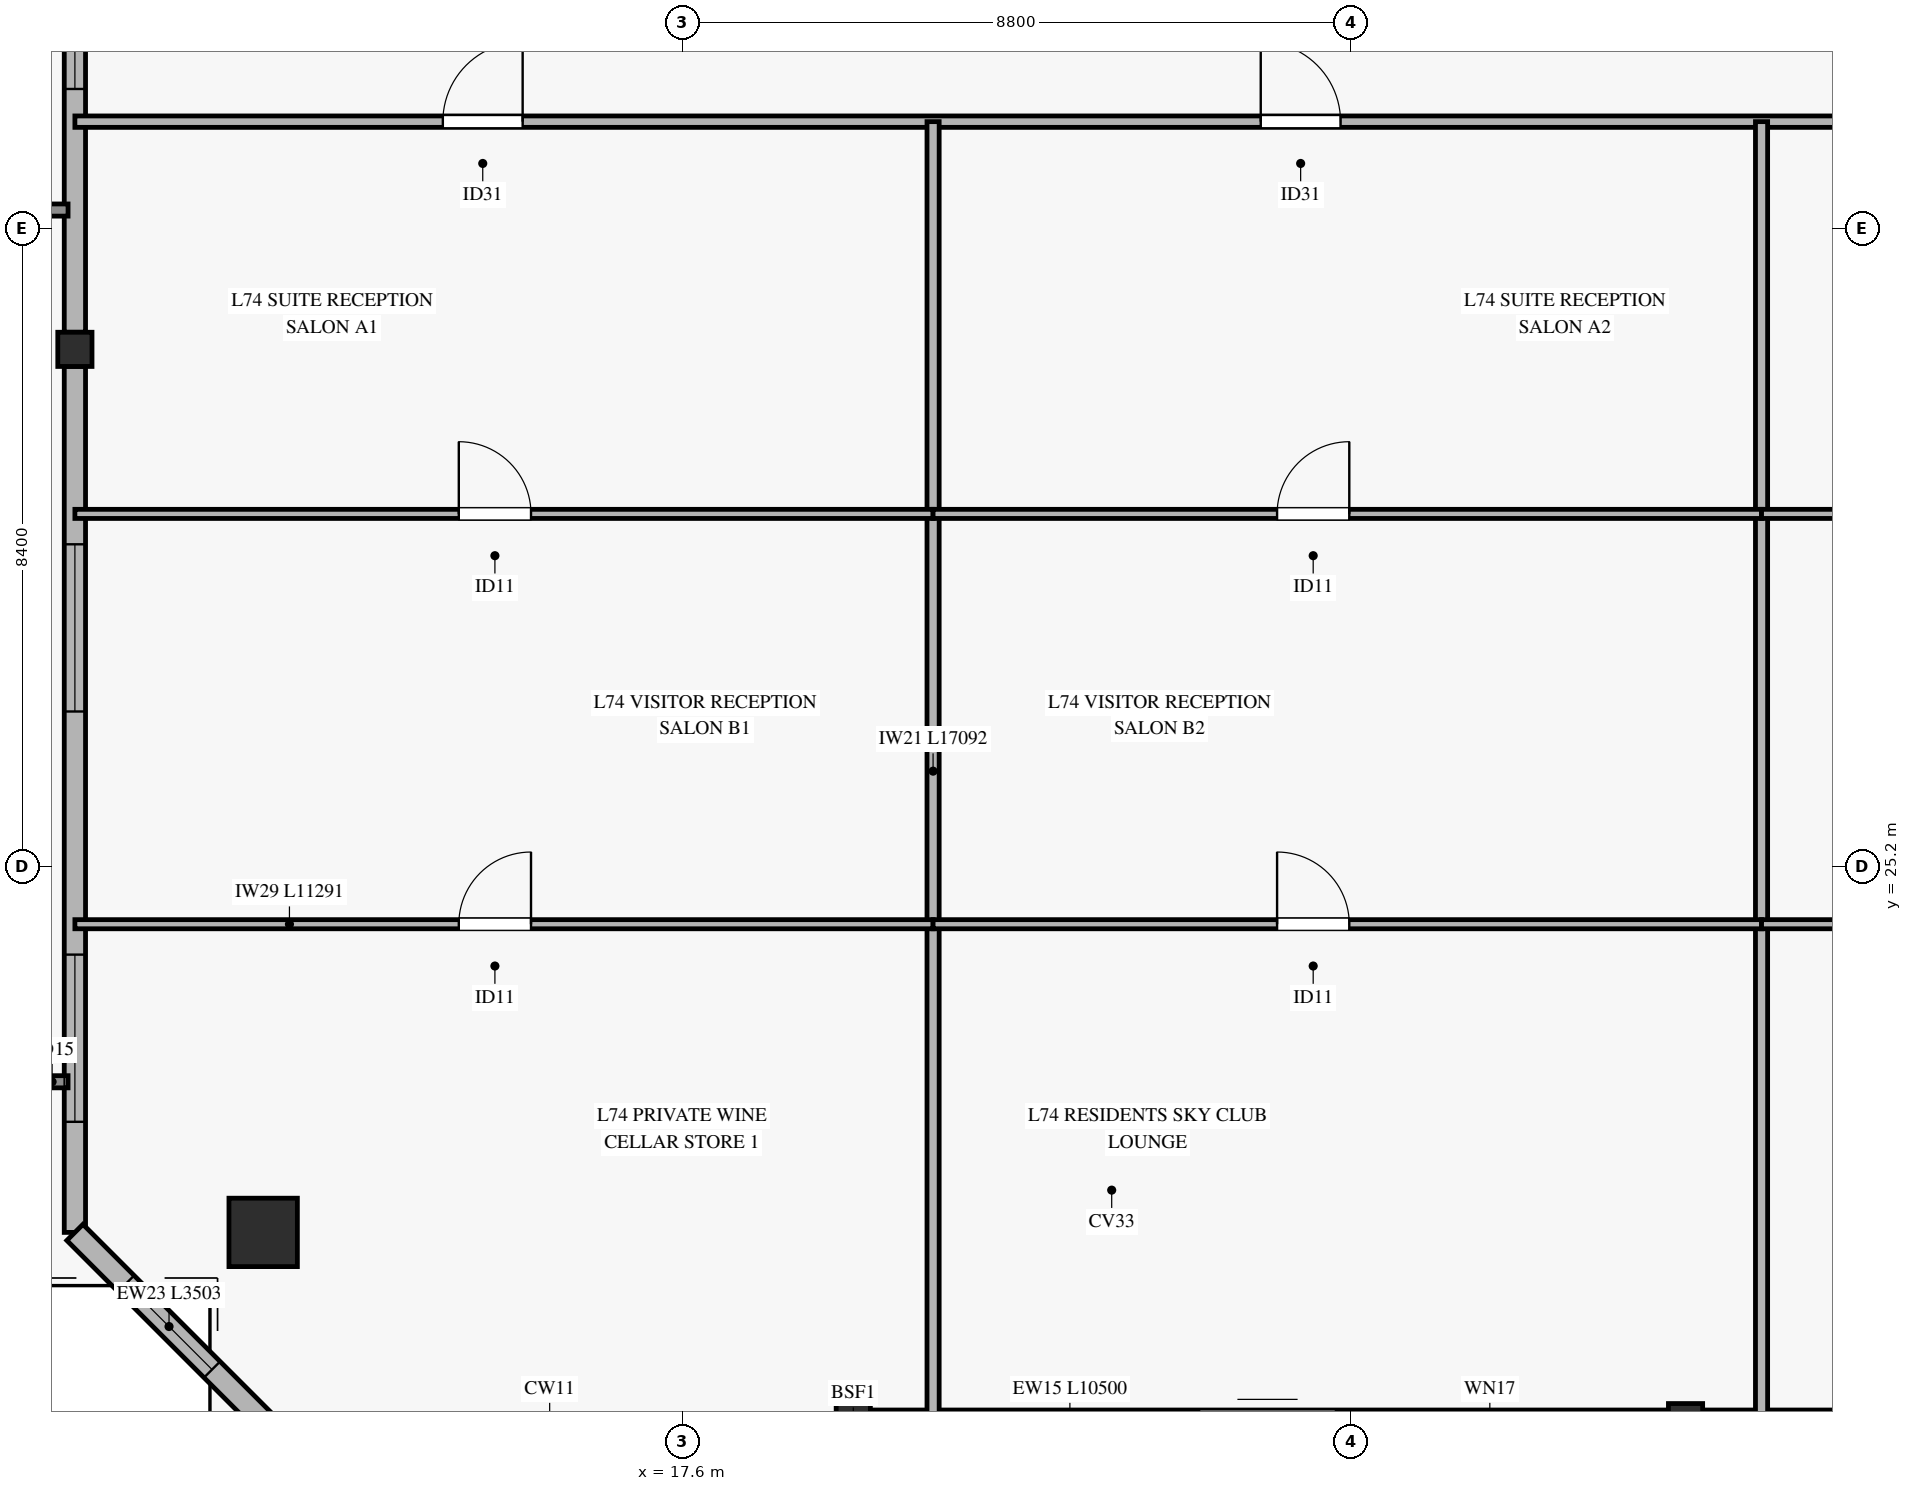
"""IFC4 building model, lengths in metres.
Left out: names, types, materials, properties, quantities, classifications, styles, units other than length and angle.
Written with IfcOpenShell. Run it as: python <this file> out.ifc"""

import sys

from ifc_helpers import new_model, si_unit, direction, frame, frame_2d, origin, origin_2d, place, context, subcontext, project, spatial, rectangle, hollow_rectangle, extrude, source, transform, mapped, element, fill, save


model = new_model("IFC4")
c1 = context("Model", 3, precision=1e-05, world=origin(), true_north=direction((0.0, 1.0)))
c2 = subcontext(c1, "Body", "Model", "MODEL_VIEW")
j1 = project(units=[si_unit("LENGTHUNIT", "METRE"), si_unit("PLANEANGLEUNIT", "RADIAN")], contexts=[c1])
p1 = place(None, origin())
s1 = spatial("IfcSite", under=j1, at=p1, CompositionType="ELEMENT")
p2 = place(p1, origin())
s2 = spatial("IfcBuilding", under=s1, at=p2, CompositionType="ELEMENT")
p3 = place(p2, frame((0.0, 0.0, 290.4)))
s3 = spatial("IfcBuildingStorey", under=s2, at=p3, CompositionType="ELEMENT", Elevation=290.4)
m1 = source(origin(), c2, "Body", "SweptSolid", [
    extrude(hollow_rectangle(XDim=0.9, YDim=0.9, WallThickness=0.04, at=origin_2d()), origin(), (0.0, 0.0, 1.0), 3.327),
])
p4 = place(p3, frame((12.086, 20.385, 0.0), z_axis=(0.110959828981, 0.266611811302, 0.957395455612), x_axis=(-0.923234733375, 0.384236420827, 0.0)))
e1 = element("IfcColumn", 1, at=p4, inside=s3, PredefinedType="COLUMN", context=c2, shape_type="MappedRepresentation", body=[
    mapped(m1, transform((0.0, 0.0, 0.0), x_axis=(1.0, 0.0, 0.0), y_axis=(0.0, 1.0, 0.0), z_axis=(0.0, 0.0, 1.0), scale=1.0)),
])
m2 = source(origin(), c2, "Body", "SweptSolid", [
    extrude(hollow_rectangle(XDim=0.45, YDim=0.45, WallThickness=0.022, at=origin_2d()), origin(), (0.0, 0.0, 1.0), 3.319),
])
for number, where, z_axis, x_axis in (
    (2, (19.85, 17.908, 0.0), (0.0, 0.281, 0.96), (-1.0, 0.0, 0.0)),
    (3, (30.8, 17.908, 0.0), (0.0, 0.281, 0.96), (-1.0, 0.0, 0.0)),
):
    element("IfcColumn", number, at=place(p3, frame(where, z_axis=z_axis, x_axis=x_axis)), inside=s3, PredefinedType="COLUMN", context=c2, shape_type="MappedRepresentation", body=[
        mapped(m2, transform((0.0, 0.0, 0.0), x_axis=(1.0, 0.0, 0.0), y_axis=(0.0, 1.0, 0.0), z_axis=(0.0, 0.0, 1.0), scale=1.0)),
    ])
m3 = source(origin(), c2, "Body", "SweptSolid", [
    extrude(hollow_rectangle(XDim=0.45, YDim=0.45, WallThickness=0.022, at=origin_2d()), origin(), (0.0, 0.0, 1.0), 3.246),
])
p5 = place(p3, frame((9.609, 32.004, 0.0), z_axis=(0.12787099786, 0.143892481709, 0.981297081222), x_axis=(-0.747495545809, 0.664266820635, 0.0)))
e4 = element("IfcColumn", 4, at=p5, inside=s3, PredefinedType="COLUMN", context=c2, shape_type="MappedRepresentation", body=[
    mapped(m3, transform((0.0, 0.0, 0.0), x_axis=(1.0, 0.0, 0.0), y_axis=(0.0, 1.0, 0.0), z_axis=(0.0, 0.0, 1.0), scale=1.0)),
])
p6 = place(p3, frame((20.075, 17.908, 0.0), z_axis=(0.0, 0.0, 1.0), x_axis=(1.0, 0.0, 0.0)))
e5 = element("IfcWall", 5, at=p6, inside=s3, PredefinedType="SOLIDWALL", context=c2, shape_type="SweptSolid", body=[
    extrude(rectangle(XDim=10.5, YDim=0.28, at=frame_2d((5.25, 0.0))), origin(), (0.0, 0.0, 1.0), 2.815),
])
p7 = place(p6, frame((4.325, 0.0, 0.0)))
e6 = element("IfcOpeningElement", 6, at=p7, cuts=e5, PredefinedType="OPENING", context=c2, shape_type="SweptSolid", body=[
    extrude(rectangle(XDim=1.8, YDim=2.25, at=frame_2d((0.9, 1.125))), frame((0.0, 0.15, 0.0), z_axis=(0.0, -1.0, 0.0), x_axis=(1.0, 0.0, 0.0)), (0.0, 0.0, 1.0), 0.3),
])
p8 = place(p6, frame((1.245, 0.0, 0.45)))
e7 = element("IfcOpeningElement", 7, at=p8, cuts=e5, PredefinedType="OPENING", context=c2, shape_type="SweptSolid", body=[
    extrude(rectangle(XDim=2.2, YDim=2.1, at=frame_2d((1.1, 1.05))), frame((0.0, 0.15, 0.0), z_axis=(0.0, -1.0, 0.0), x_axis=(1.0, 0.0, 0.0)), (0.0, 0.0, 1.0), 0.3),
])
p9 = place(p6, frame((7.35, 0.0, 0.45)))
e8 = element("IfcOpeningElement", 8, at=p9, cuts=e5, PredefinedType="OPENING", context=c2, shape_type="SweptSolid", body=[
    extrude(rectangle(XDim=1.6, YDim=2.0, at=frame_2d((0.8, 1.0))), frame((0.0, 0.15, 0.0), z_axis=(0.0, -1.0, 0.0), x_axis=(1.0, 0.0, 0.0)), (0.0, 0.0, 1.0), 0.3),
])
p10 = place(p3, frame((31.025, 17.908, 0.0), z_axis=(0.0, 0.0, 1.0), x_axis=(1.0, 0.0, 0.0)))
e9 = element("IfcWall", 9, at=p10, inside=s3, PredefinedType="SOLIDWALL", context=c2, shape_type="SweptSolid", body=[
    extrude(rectangle(XDim=6.3, YDim=0.28, at=frame_2d((3.15, 0.0))), origin(), (0.0, 0.0, 1.0), 2.815),
])
p11 = place(p3, frame((9.609, 20.385, 0.0), z_axis=(0.0, 0.0, 1.0), x_axis=(0.0, 1.0, 0.0)))
e10 = element("IfcWall", 10, at=p11, inside=s3, PredefinedType="SOLIDWALL", context=c2, shape_type="SweptSolid", body=[
    extrude(rectangle(XDim=11.394, YDim=0.28, at=frame_2d((5.697, 0.0))), origin(), (0.0, 0.0, 1.0), 2.815),
])
p12 = place(p11, frame((1.455, 0.0, 0.45)))
e11 = element("IfcOpeningElement", 11, at=p12, cuts=e10, PredefinedType="OPENING", context=c2, shape_type="SweptSolid", body=[
    extrude(rectangle(XDim=2.2, YDim=2.1, at=frame_2d((1.1, 1.05))), frame((0.0, 0.15, 0.0), z_axis=(0.0, -1.0, 0.0), x_axis=(1.0, 0.0, 0.0)), (0.0, 0.0, 1.0), 0.3),
])
p13 = place(p11, frame((6.854, 0.0, 0.45)))
e12 = element("IfcOpeningElement", 12, at=p13, cuts=e10, PredefinedType="OPENING", context=c2, shape_type="SweptSolid", body=[
    extrude(rectangle(XDim=2.2, YDim=2.1, at=frame_2d((1.1, 1.05))), frame((0.0, 0.15, 0.0), z_axis=(0.0, -1.0, 0.0), x_axis=(1.0, 0.0, 0.0)), (0.0, 0.0, 1.0), 0.3),
])
p14 = place(p3, frame((9.609, 32.229, 0.0), z_axis=(0.0, 0.0, 1.0), x_axis=(0.0, 1.0, 0.0)))
e13 = element("IfcWall", 13, at=p14, inside=s3, PredefinedType="SOLIDWALL", context=c2, shape_type="SweptSolid", body=[
    extrude(rectangle(XDim=11.393, YDim=0.28, at=frame_2d((5.697, 0.0))), origin(), (0.0, 0.0, 1.0), 2.815),
])
p15 = place(p14, frame((3.201, 0.0, 0.45)))
e14 = element("IfcOpeningElement", 14, at=p15, cuts=e13, PredefinedType="OPENING", context=c2, shape_type="SweptSolid", body=[
    extrude(rectangle(XDim=1.6, YDim=2.0, at=frame_2d((0.8, 1.0))), frame((0.0, 0.15, 0.0), z_axis=(0.0, -1.0, 0.0), x_axis=(1.0, 0.0, 0.0)), (0.0, 0.0, 1.0), 0.3),
])
p16 = place(p3, frame((9.609, 20.385, 0.0), z_axis=(0.0, 0.0, 1.0), x_axis=(0.707106781187, -0.707106781187, 0.0)))
e15 = element("IfcWall", 15, at=p16, inside=s3, PredefinedType="SOLIDWALL", context=c2, shape_type="SweptSolid", body=[
    extrude(rectangle(XDim=3.503, YDim=0.3, at=frame_2d((1.751, 0.0))), origin(), (0.0, 0.0, 1.0), 2.815),
])
p17 = place(p16, frame((0.952, 0.0, 0.45)))
e16 = element("IfcOpeningElement", 16, at=p17, cuts=e15, PredefinedType="OPENING", context=c2, shape_type="SweptSolid", body=[
    extrude(rectangle(XDim=1.6, YDim=2.0, at=frame_2d((0.8, 1.0))), frame((0.0, 0.16, 0.0), z_axis=(0.0, -1.0, 0.0), x_axis=(1.0, 0.0, 0.0)), (0.0, 0.0, 1.0), 0.32),
])
p18 = place(p3, frame((9.609, 35.0, 0.0), z_axis=(0.0, 0.0, 1.0), x_axis=(1.0, 0.0, 0.0)))
e17 = element("IfcWall", 17, at=p18, inside=s3, PredefinedType="PARTITIONING", context=c2, shape_type="SweptSolid", body=[
    extrude(rectangle(XDim=51.182, YDim=0.15, at=frame_2d((25.591, 0.0))), origin(), (0.0, 0.0, 1.0), 2.47),
])
p19 = place(p18, frame((4.841, 0.0, 0.0)))
e18 = element("IfcOpeningElement", 18, at=p19, cuts=e17, PredefinedType="OPENING", context=c2, shape_type="SweptSolid", body=[
    extrude(rectangle(XDim=1.05, YDim=2.15, at=frame_2d((0.525, 1.075))), frame((0.0, 0.085, 0.0), z_axis=(0.0, -1.0, 0.0), x_axis=(1.0, 0.0, 0.0)), (0.0, 0.0, 1.0), 0.17),
])
p20 = place(p18, frame((15.602, 0.0, 0.0)))
e19 = element("IfcOpeningElement", 19, at=p20, cuts=e17, PredefinedType="OPENING", context=c2, shape_type="SweptSolid", body=[
    extrude(rectangle(XDim=1.05, YDim=2.15, at=frame_2d((0.525, 1.075))), frame((0.0, 0.085, 0.0), z_axis=(0.0, -1.0, 0.0), x_axis=(1.0, 0.0, 0.0)), (0.0, 0.0, 1.0), 0.17),
])
p21 = place(p18, frame((26.464, 0.0, 0.0)))
e20 = element("IfcOpeningElement", 20, at=p21, cuts=e17, PredefinedType="OPENING", context=c2, shape_type="SweptSolid", body=[
    extrude(rectangle(XDim=1.05, YDim=2.15, at=frame_2d((0.525, 1.075))), frame((0.0, 0.085, 0.0), z_axis=(0.0, -1.0, 0.0), x_axis=(1.0, 0.0, 0.0)), (0.0, 0.0, 1.0), 0.17),
])
p22 = place(p18, frame((39.839, 0.0, 0.0)))
e21 = element("IfcOpeningElement", 21, at=p22, cuts=e17, PredefinedType="OPENING", context=c2, shape_type="SweptSolid", body=[
    extrude(rectangle(XDim=1.05, YDim=2.15, at=frame_2d((0.525, 1.075))), frame((0.0, 0.085, 0.0), z_axis=(0.0, -1.0, 0.0), x_axis=(1.0, 0.0, 0.0)), (0.0, 0.0, 1.0), 0.17),
])
for number, where, z_axis, x_axis in (
    (22, (20.9, 17.908, 0.0), (0.0, 0.0, 1.0), (0.0, 1.0, 0.0)),
    (23, (31.8, 17.908, 0.0), (0.0, 0.0, 1.0), (0.0, 1.0, 0.0)),
):
    element("IfcWall", number, at=place(p3, frame(where, z_axis=z_axis, x_axis=x_axis)), inside=s3, PredefinedType="PARTITIONING", context=c2, shape_type="SweptSolid", body=[
        extrude(rectangle(XDim=17.092, YDim=0.16, at=frame_2d((8.546, 0.0))), origin(), (0.0, 0.0, 1.0), 2.77),
    ])
p23 = place(p3, frame((9.609, 24.44, 0.0), z_axis=(0.0, 0.0, 1.0), x_axis=(1.0, 0.0, 0.0)))
e24 = element("IfcWall", 24, at=p23, inside=s3, PredefinedType="PARTITIONING", context=c2, shape_type="SweptSolid", body=[
    extrude(rectangle(XDim=11.291, YDim=0.12, at=frame_2d((5.646, 0.0))), origin(), (0.0, 0.0, 1.0), 2.47),
])
p24 = place(p23, frame((5.051, 0.0, 0.0)))
e25 = element("IfcOpeningElement", 25, at=p24, cuts=e24, PredefinedType="OPENING", context=c2, shape_type="SweptSolid", body=[
    extrude(rectangle(XDim=0.95, YDim=2.1, at=frame_2d((0.475, 1.05))), frame((0.0, 0.07, 0.0), z_axis=(0.0, -1.0, 0.0), x_axis=(1.0, 0.0, 0.0)), (0.0, 0.0, 1.0), 0.14),
])
p25 = place(p3, frame((9.609, 29.839, 0.0), z_axis=(0.0, 0.0, 1.0), x_axis=(1.0, 0.0, 0.0)))
e26 = element("IfcWall", 26, at=p25, inside=s3, PredefinedType="PARTITIONING", context=c2, shape_type="SweptSolid", body=[
    extrude(rectangle(XDim=11.291, YDim=0.12, at=frame_2d((5.646, 0.0))), origin(), (0.0, 0.0, 1.0), 2.47),
])
p26 = place(p25, frame((5.051, 0.0, 0.0)))
e27 = element("IfcOpeningElement", 27, at=p26, cuts=e26, PredefinedType="OPENING", context=c2, shape_type="SweptSolid", body=[
    extrude(rectangle(XDim=0.95, YDim=2.1, at=frame_2d((0.475, 1.05))), frame((0.0, 0.07, 0.0), z_axis=(0.0, -1.0, 0.0), x_axis=(1.0, 0.0, 0.0)), (0.0, 0.0, 1.0), 0.14),
])
p27 = place(p3, frame((20.9, 24.44, 0.0), z_axis=(0.0, 0.0, 1.0), x_axis=(1.0, 0.0, 0.0)))
e28 = element("IfcWall", 28, at=p27, inside=s3, PredefinedType="PARTITIONING", context=c2, shape_type="SweptSolid", body=[
    extrude(rectangle(XDim=10.9, YDim=0.12, at=frame_2d((5.45, 0.0))), origin(), (0.0, 0.0, 1.0), 2.47),
])
p28 = place(p27, frame((4.526, 0.0, 0.0)))
e29 = element("IfcOpeningElement", 29, at=p28, cuts=e28, PredefinedType="OPENING", context=c2, shape_type="SweptSolid", body=[
    extrude(rectangle(XDim=0.95, YDim=2.1, at=frame_2d((0.475, 1.05))), frame((0.0, 0.07, 0.0), z_axis=(0.0, -1.0, 0.0), x_axis=(1.0, 0.0, 0.0)), (0.0, 0.0, 1.0), 0.14),
])
p29 = place(p3, frame((20.9, 29.839, 0.0), z_axis=(0.0, 0.0, 1.0), x_axis=(1.0, 0.0, 0.0)))
e30 = element("IfcWall", 30, at=p29, inside=s3, PredefinedType="PARTITIONING", context=c2, shape_type="SweptSolid", body=[
    extrude(rectangle(XDim=10.9, YDim=0.12, at=frame_2d((5.45, 0.0))), origin(), (0.0, 0.0, 1.0), 2.47),
])
p30 = place(p29, frame((4.526, 0.0, 0.0)))
e31 = element("IfcOpeningElement", 31, at=p30, cuts=e30, PredefinedType="OPENING", context=c2, shape_type="SweptSolid", body=[
    extrude(rectangle(XDim=0.95, YDim=2.1, at=frame_2d((0.475, 1.05))), frame((0.0, 0.07, 0.0), z_axis=(0.0, -1.0, 0.0), x_axis=(1.0, 0.0, 0.0)), (0.0, 0.0, 1.0), 0.14),
])
p31 = place(p3, frame((31.8, 24.44, 0.0), z_axis=(0.0, 0.0, 1.0), x_axis=(1.0, 0.0, 0.0)))
e32 = element("IfcWall", 32, at=p31, inside=s3, PredefinedType="PARTITIONING", context=c2, shape_type="SweptSolid", body=[
    extrude(rectangle(XDim=10.8, YDim=0.12, at=frame_2d((5.4, 0.0))), origin(), (0.0, 0.0, 1.0), 2.47),
])
p32 = place(p31, frame((4.486, 0.0, 0.0)))
e33 = element("IfcOpeningElement", 33, at=p32, cuts=e32, PredefinedType="OPENING", context=c2, shape_type="SweptSolid", body=[
    extrude(rectangle(XDim=0.95, YDim=2.1, at=frame_2d((0.475, 1.05))), frame((0.0, 0.07, 0.0), z_axis=(0.0, -1.0, 0.0), x_axis=(1.0, 0.0, 0.0)), (0.0, 0.0, 1.0), 0.14),
])
p33 = place(p3, frame((31.8, 29.839, 0.0), z_axis=(0.0, 0.0, 1.0), x_axis=(1.0, 0.0, 0.0)))
e34 = element("IfcWall", 34, at=p33, inside=s3, PredefinedType="PARTITIONING", context=c2, shape_type="SweptSolid", body=[
    extrude(rectangle(XDim=10.8, YDim=0.12, at=frame_2d((5.4, 0.0))), origin(), (0.0, 0.0, 1.0), 2.47),
])
p34 = place(p33, frame((4.486, 0.0, 0.0)))
e35 = element("IfcOpeningElement", 35, at=p34, cuts=e34, PredefinedType="OPENING", context=c2, shape_type="SweptSolid", body=[
    extrude(rectangle(XDim=0.95, YDim=2.1, at=frame_2d((0.475, 1.05))), frame((0.0, 0.07, 0.0), z_axis=(0.0, -1.0, 0.0), x_axis=(1.0, 0.0, 0.0)), (0.0, 0.0, 1.0), 0.14),
])
m4 = source(origin(), c2, "Body", "SweptSolid", [
    extrude(rectangle(XDim=2.2, YDim=2.1, at=frame_2d((1.1, 1.05))), frame((0.0, 0.03, 0.0), z_axis=(0.0, -1.0, 0.0), x_axis=(1.0, 0.0, 0.0)), (0.0, 0.0, 1.0), 0.06),
])
p35 = place(p12, origin())
e36 = element("IfcWindow", 36, at=p35, inside=s3, PartitioningType="SINGLE_PANEL", PredefinedType="WINDOW", context=c2, shape_type="MappedRepresentation", body=[
    mapped(m4, transform((0.0, 0.0, 0.0), x_axis=(1.0, 0.0, 0.0), y_axis=(0.0, 1.0, 0.0), z_axis=(0.0, 0.0, 1.0), scale=1.0)),
])
fill(e11, e36)
p36 = place(p13, origin())
e37 = element("IfcWindow", 37, at=p36, inside=s3, PartitioningType="SINGLE_PANEL", PredefinedType="WINDOW", context=c2, shape_type="MappedRepresentation", body=[
    mapped(m4, transform((0.0, 0.0, 0.0), x_axis=(1.0, 0.0, 0.0), y_axis=(0.0, 1.0, 0.0), z_axis=(0.0, 0.0, 1.0), scale=1.0)),
])
fill(e12, e37)
m5 = source(origin(), c2, "Body", "SweptSolid", [
    extrude(rectangle(XDim=1.6, YDim=2.0, at=frame_2d((0.8, 1.0))), frame((0.0, 0.03, 0.0), z_axis=(0.0, -1.0, 0.0), x_axis=(1.0, 0.0, 0.0)), (0.0, 0.0, 1.0), 0.06),
])
p37 = place(p15, origin())
e38 = element("IfcWindow", 38, at=p37, inside=s3, PartitioningType="SINGLE_PANEL", PredefinedType="WINDOW", context=c2, shape_type="MappedRepresentation", body=[
    mapped(m5, transform((0.0, 0.0, 0.0), x_axis=(1.0, 0.0, 0.0), y_axis=(0.0, 1.0, 0.0), z_axis=(0.0, 0.0, 1.0), scale=1.0)),
])
fill(e14, e38)
p38 = place(p17, origin())
e39 = element("IfcWindow", 39, at=p38, inside=s3, PartitioningType="SINGLE_PANEL", PredefinedType="WINDOW", context=c2, shape_type="MappedRepresentation", body=[
    mapped(m5, transform((0.0, 0.0, 0.0), x_axis=(1.0, 0.0, 0.0), y_axis=(0.0, 1.0, 0.0), z_axis=(0.0, 0.0, 1.0), scale=1.0)),
])
fill(e16, e39)
m6 = source(origin(), c2, "Body", "SweptSolid", [
    extrude(rectangle(XDim=1.05, YDim=2.15, at=frame_2d((0.525, 1.075))), frame((0.0, 0.025, 0.0), z_axis=(0.0, -1.0, 0.0), x_axis=(1.0, 0.0, 0.0)), (0.0, 0.0, 1.0), 0.05),
])
p39 = place(p19, origin())
e40 = element("IfcDoor", 40, at=p39, inside=s3, OperationType="SINGLE_SWING_RIGHT", PredefinedType="DOOR", context=c2, shape_type="MappedRepresentation", body=[
    mapped(m6, transform((0.0, 0.0, 0.0), x_axis=(1.0, 0.0, 0.0), y_axis=(0.0, 1.0, 0.0), z_axis=(0.0, 0.0, 1.0), scale=1.0)),
])
fill(e18, e40)
m7 = source(origin(), c2, "Body", "SweptSolid", [
    extrude(rectangle(XDim=0.95, YDim=2.1, at=frame_2d((0.475, 1.05))), frame((0.0, 0.025, 0.0), z_axis=(0.0, -1.0, 0.0), x_axis=(1.0, 0.0, 0.0)), (0.0, 0.0, 1.0), 0.05),
])
p40 = place(p26, origin())
e41 = element("IfcDoor", 41, at=p40, inside=s3, OperationType="SINGLE_SWING_LEFT", PredefinedType="DOOR", context=c2, shape_type="MappedRepresentation", body=[
    mapped(m7, transform((0.0, 0.0, 0.0), x_axis=(1.0, 0.0, 0.0), y_axis=(0.0, 1.0, 0.0), z_axis=(0.0, 0.0, 1.0), scale=1.0)),
])
fill(e27, e41)
p41 = place(p24, origin())
e42 = element("IfcDoor", 42, at=p41, inside=s3, OperationType="SINGLE_SWING_RIGHT", PredefinedType="DOOR", context=c2, shape_type="MappedRepresentation", body=[
    mapped(m7, transform((0.0, 0.0, 0.0), x_axis=(1.0, 0.0, 0.0), y_axis=(0.0, 1.0, 0.0), z_axis=(0.0, 0.0, 1.0), scale=1.0)),
])
fill(e25, e42)
p42 = place(p20, origin())
e43 = element("IfcDoor", 43, at=p42, inside=s3, OperationType="SINGLE_SWING_LEFT", PredefinedType="DOOR", context=c2, shape_type="MappedRepresentation", body=[
    mapped(m6, transform((0.0, 0.0, 0.0), x_axis=(1.0, 0.0, 0.0), y_axis=(0.0, 1.0, 0.0), z_axis=(0.0, 0.0, 1.0), scale=1.0)),
])
fill(e19, e43)
p43 = place(p30, origin())
e44 = element("IfcDoor", 44, at=p43, inside=s3, OperationType="SINGLE_SWING_RIGHT", PredefinedType="DOOR", context=c2, shape_type="MappedRepresentation", body=[
    mapped(m7, transform((0.0, 0.0, 0.0), x_axis=(1.0, 0.0, 0.0), y_axis=(0.0, 1.0, 0.0), z_axis=(0.0, 0.0, 1.0), scale=1.0)),
])
fill(e31, e44)
p44 = place(p28, origin())
e45 = element("IfcDoor", 45, at=p44, inside=s3, OperationType="SINGLE_SWING_LEFT", PredefinedType="DOOR", context=c2, shape_type="MappedRepresentation", body=[
    mapped(m7, transform((0.0, 0.0, 0.0), x_axis=(1.0, 0.0, 0.0), y_axis=(0.0, 1.0, 0.0), z_axis=(0.0, 0.0, 1.0), scale=1.0)),
])
fill(e29, e45)
save(model, sys.argv[1])
